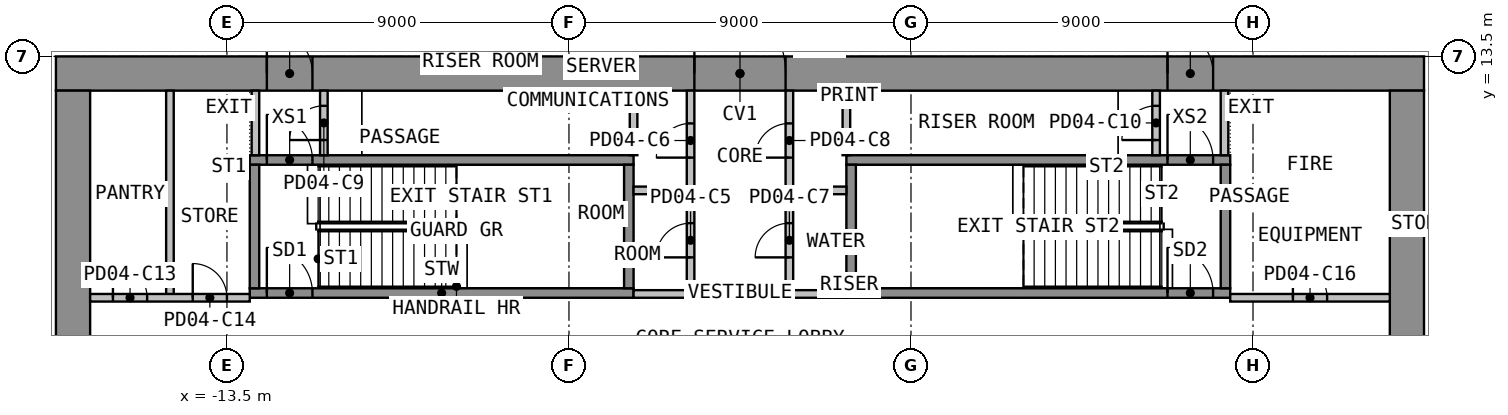
"""IFC4 building model, lengths in metres.
Left out: names, types, materials, properties, quantities, classifications, styles, units other than length and angle.
Written with IfcOpenShell. Run it as: python <this file> out.ifc"""

import sys

from ifc_helpers import new_model, si_unit, direction, frame, frame_2d, origin, place, context, subcontext, project, spatial, rectangle, extrude, element, fill, save


model = new_model("IFC4")
c1 = context("Model", 3, precision=1e-05, world=origin(), true_north=direction((0.0, 1.0)))
c2 = subcontext(c1, "Body", "Model", "MODEL_VIEW")
j1 = project(units=[si_unit("LENGTHUNIT", "METRE"), si_unit("PLANEANGLEUNIT", "RADIAN")], contexts=[c1])
p1 = place(None, origin())
s1 = spatial("IfcSite", under=j1, at=p1, CompositionType="ELEMENT")
p2 = place(p1, origin())
s2 = spatial("IfcBuilding", under=s1, at=p2, CompositionType="ELEMENT")
p3 = place(p2, frame((0.0, 0.0, 20.4)))
s3 = spatial("IfcBuildingStorey", under=s2, at=p3, CompositionType="ELEMENT", Elevation=20.4)
p4 = place(p3, frame((-18.0, 13.05, 0.0), z_axis=(0.0, 0.0, 1.0), x_axis=(1.0, 0.0, 0.0)))
e1 = element("IfcWall", 1, at=p4, inside=s3, PredefinedType="SHEAR", context=c2, shape_type="SweptSolid", body=[
    extrude(rectangle(XDim=36.0, YDim=0.9, at=frame_2d((18.0, 0.0))), origin(), (0.0, 0.0, 1.0), 4.4),
])
p5 = place(p4, frame((16.8, 0.0, 0.0)))
e2 = element("IfcOpeningElement", 2, at=p5, cuts=e1, PredefinedType="OPENING", context=c2, shape_type="SweptSolid", body=[
    extrude(rectangle(XDim=2.4, YDim=2.1, at=frame_2d((1.2, 1.05))), frame((0.0, 0.46, 0.0), z_axis=(0.0, -1.0, 0.0), x_axis=(1.0, 0.0, 0.0)), (0.0, 0.0, 1.0), 0.92),
])
p6 = place(p4, frame((5.55, 0.0, 0.0)))
e3 = element("IfcOpeningElement", 3, at=p6, cuts=e1, PredefinedType="OPENING", context=c2, shape_type="SweptSolid", body=[
    extrude(rectangle(XDim=1.2, YDim=2.1, at=frame_2d((0.6, 1.05))), frame((0.0, 0.46, 0.0), z_axis=(0.0, -1.0, 0.0), x_axis=(1.0, 0.0, 0.0)), (0.0, 0.0, 1.0), 0.92),
])
p7 = place(p4, frame((29.25, 0.0, 0.0)))
e4 = element("IfcOpeningElement", 4, at=p7, cuts=e1, PredefinedType="OPENING", context=c2, shape_type="SweptSolid", body=[
    extrude(rectangle(XDim=1.2, YDim=2.1, at=frame_2d((0.6, 1.05))), frame((0.0, 0.46, 0.0), z_axis=(0.0, -1.0, 0.0), x_axis=(1.0, 0.0, 0.0)), (0.0, 0.0, 1.0), 0.92),
])
p8 = place(p3, frame((-17.55, -12.6, 0.0), z_axis=(0.0, 0.0, 1.0), x_axis=(0.0, 1.0, 0.0)))
e5 = element("IfcWall", 5, at=p8, inside=s3, PredefinedType="SHEAR", context=c2, shape_type="SweptSolid", body=[
    extrude(rectangle(XDim=25.2, YDim=0.9, at=frame_2d((12.6, 0.0))), origin(), (0.0, 0.0, 1.0), 4.4),
])
p9 = place(p8, frame((11.4, 0.0, 0.0)))
e6 = element("IfcOpeningElement", 6, at=p9, cuts=e5, PredefinedType="OPENING", context=c2, shape_type="SweptSolid", body=[
    extrude(rectangle(XDim=2.4, YDim=2.1, at=frame_2d((1.2, 1.05))), frame((0.0, 0.46, 0.0), z_axis=(0.0, -1.0, 0.0), x_axis=(1.0, 0.0, 0.0)), (0.0, 0.0, 1.0), 0.92),
])
p10 = place(p3, frame((17.55, -12.6, 0.0), z_axis=(0.0, 0.0, 1.0), x_axis=(0.0, 1.0, 0.0)))
e7 = element("IfcWall", 7, at=p10, inside=s3, PredefinedType="SHEAR", context=c2, shape_type="SweptSolid", body=[
    extrude(rectangle(XDim=25.2, YDim=0.9, at=frame_2d((12.6, 0.0))), origin(), (0.0, 0.0, 1.0), 4.4),
])
p11 = place(p10, frame((11.4, 0.0, 0.0)))
e8 = element("IfcOpeningElement", 8, at=p11, cuts=e7, PredefinedType="OPENING", context=c2, shape_type="SweptSolid", body=[
    extrude(rectangle(XDim=2.4, YDim=2.1, at=frame_2d((1.2, 1.05))), frame((0.0, 0.46, 0.0), z_axis=(0.0, -1.0, 0.0), x_axis=(1.0, 0.0, 0.0)), (0.0, 0.0, 1.0), 0.92),
])
p12 = place(p3, frame((-12.9, 7.275, 0.0), z_axis=(0.0, 0.0, 1.0), x_axis=(1.0, 0.0, 0.0)))
e9 = element("IfcWall", 9, at=p12, inside=s3, PredefinedType="SHEAR", context=c2, shape_type="SweptSolid", body=[
    extrude(rectangle(XDim=10.1, YDim=0.25, at=frame_2d((5.05, 0.0))), origin(), (0.0, 0.0, 1.0), 4.4),
])
p13 = place(p12, frame((0.45, 0.0, 0.0)))
e10 = element("IfcOpeningElement", 10, at=p13, cuts=e9, PredefinedType="OPENING", context=c2, shape_type="SweptSolid", body=[
    extrude(rectangle(XDim=1.2, YDim=2.1, at=frame_2d((0.6, 1.05))), frame((0.0, 0.135, 0.0), z_axis=(0.0, -1.0, 0.0), x_axis=(1.0, 0.0, 0.0)), (0.0, 0.0, 1.0), 0.27),
])
p14 = place(p3, frame((-12.9, 10.775, 0.0), z_axis=(0.0, 0.0, 1.0), x_axis=(1.0, 0.0, 0.0)))
e11 = element("IfcWall", 11, at=p14, inside=s3, PredefinedType="SHEAR", context=c2, shape_type="SweptSolid", body=[
    extrude(rectangle(XDim=10.1, YDim=0.25, at=frame_2d((5.05, 0.0))), origin(), (0.0, 0.0, 1.0), 4.4),
])
p15 = place(p14, frame((0.45, 0.0, 0.0)))
e12 = element("IfcOpeningElement", 12, at=p15, cuts=e11, PredefinedType="OPENING", context=c2, shape_type="SweptSolid", body=[
    extrude(rectangle(XDim=1.2, YDim=2.1, at=frame_2d((0.6, 1.05))), frame((0.0, 0.135, 0.0), z_axis=(0.0, -1.0, 0.0), x_axis=(1.0, 0.0, 0.0)), (0.0, 0.0, 1.0), 0.27),
])
for number, where, z_axis, x_axis in (
    (13, (-12.775, 7.4, 0.0), (0.0, 0.0, 1.0), (0.0, 1.0, 0.0)),
    (14, (-2.925, 7.4, 0.0), (0.0, 0.0, 1.0), (0.0, 1.0, 0.0)),
):
    element("IfcWall", number, at=place(p3, frame(where, z_axis=z_axis, x_axis=x_axis)), inside=s3, PredefinedType="SHEAR", context=c2, shape_type="SweptSolid", body=[
        extrude(rectangle(XDim=3.25, YDim=0.25, at=frame_2d((1.625, 0.0))), origin(), (0.0, 0.0, 1.0), 4.4),
    ])
p16 = place(p3, frame((2.8, 7.275, 0.0), z_axis=(0.0, 0.0, 1.0), x_axis=(1.0, 0.0, 0.0)))
e15 = element("IfcWall", 15, at=p16, inside=s3, PredefinedType="SHEAR", context=c2, shape_type="SweptSolid", body=[
    extrude(rectangle(XDim=10.1, YDim=0.25, at=frame_2d((5.05, 0.0))), origin(), (0.0, 0.0, 1.0), 4.4),
])
p17 = place(p16, frame((8.45, 0.0, 0.0)))
e16 = element("IfcOpeningElement", 16, at=p17, cuts=e15, PredefinedType="OPENING", context=c2, shape_type="SweptSolid", body=[
    extrude(rectangle(XDim=1.2, YDim=2.1, at=frame_2d((0.6, 1.05))), frame((0.0, 0.135, 0.0), z_axis=(0.0, -1.0, 0.0), x_axis=(1.0, 0.0, 0.0)), (0.0, 0.0, 1.0), 0.27),
])
p18 = place(p3, frame((2.8, 10.775, 0.0), z_axis=(0.0, 0.0, 1.0), x_axis=(1.0, 0.0, 0.0)))
e17 = element("IfcWall", 17, at=p18, inside=s3, PredefinedType="SHEAR", context=c2, shape_type="SweptSolid", body=[
    extrude(rectangle(XDim=10.1, YDim=0.25, at=frame_2d((5.05, 0.0))), origin(), (0.0, 0.0, 1.0), 4.4),
])
p19 = place(p18, frame((8.45, 0.0, 0.0)))
e18 = element("IfcOpeningElement", 18, at=p19, cuts=e17, PredefinedType="OPENING", context=c2, shape_type="SweptSolid", body=[
    extrude(rectangle(XDim=1.2, YDim=2.1, at=frame_2d((0.6, 1.05))), frame((0.0, 0.135, 0.0), z_axis=(0.0, -1.0, 0.0), x_axis=(1.0, 0.0, 0.0)), (0.0, 0.0, 1.0), 0.27),
])
for number, where, z_axis, x_axis in (
    (19, (2.925, 7.4, 0.0), (0.0, 0.0, 1.0), (0.0, 1.0, 0.0)),
    (20, (12.775, 7.4, 0.0), (0.0, 0.0, 1.0), (0.0, 1.0, 0.0)),
):
    element("IfcWall", number, at=place(p3, frame(where, z_axis=z_axis, x_axis=x_axis)), inside=s3, PredefinedType="SHEAR", context=c2, shape_type="SweptSolid", body=[
        extrude(rectangle(XDim=3.25, YDim=0.25, at=frame_2d((1.625, 0.0))), origin(), (0.0, 0.0, 1.0), 4.4),
    ])
for number, where, z_axis, x_axis in (
    (21, (-2.8, 7.25, 0.0), (0.0, 0.0, 1.0), (1.0, 0.0, 0.0)),
    (22, (-2.8, 9.975, 0.0), (0.0, 0.0, 1.0), (1.0, 0.0, 0.0)),
    (23, (1.4, 7.25, 0.0), (0.0, 0.0, 1.0), (1.0, 0.0, 0.0)),
    (24, (1.4, 9.975, 0.0), (0.0, 0.0, 1.0), (1.0, 0.0, 0.0)),
):
    element("IfcWall", number, at=place(p3, frame(where, z_axis=z_axis, x_axis=x_axis)), inside=s3, PredefinedType="PARTITIONING", context=c2, shape_type="SweptSolid", body=[
        extrude(rectangle(XDim=1.4, YDim=0.2, at=frame_2d((0.7, 0.0))), origin(), (0.0, 0.0, 1.0), 4.4),
    ])
p20 = place(p3, frame((-1.3, 7.15, 0.0), z_axis=(0.0, 0.0, 1.0), x_axis=(0.0, 1.0, 0.0)))
e25 = element("IfcWall", 25, at=p20, inside=s3, PredefinedType="PARTITIONING", context=c2, shape_type="SweptSolid", body=[
    extrude(rectangle(XDim=5.45, YDim=0.2, at=frame_2d((2.725, 0.0))), origin(), (0.0, 0.0, 1.0), 4.4),
])
p21 = place(p20, frame((1.062, 0.0, 0.0)))
e26 = element("IfcOpeningElement", 26, at=p21, cuts=e25, PredefinedType="OPENING", context=c2, shape_type="SweptSolid", body=[
    extrude(rectangle(XDim=0.9, YDim=2.1, at=frame_2d((0.45, 1.05))), frame((0.0, 0.11, 0.0), z_axis=(0.0, -1.0, 0.0), x_axis=(1.0, 0.0, 0.0)), (0.0, 0.0, 1.0), 0.22),
])
p22 = place(p20, frame((3.688, 0.0, 0.0)))
e27 = element("IfcOpeningElement", 27, at=p22, cuts=e25, PredefinedType="OPENING", context=c2, shape_type="SweptSolid", body=[
    extrude(rectangle(XDim=0.9, YDim=2.1, at=frame_2d((0.45, 1.05))), frame((0.0, 0.11, 0.0), z_axis=(0.0, -1.0, 0.0), x_axis=(1.0, 0.0, 0.0)), (0.0, 0.0, 1.0), 0.22),
])
p23 = place(p3, frame((1.3, 7.15, 0.0), z_axis=(0.0, 0.0, 1.0), x_axis=(0.0, 1.0, 0.0)))
e28 = element("IfcWall", 28, at=p23, inside=s3, PredefinedType="PARTITIONING", context=c2, shape_type="SweptSolid", body=[
    extrude(rectangle(XDim=5.45, YDim=0.2, at=frame_2d((2.725, 0.0))), origin(), (0.0, 0.0, 1.0), 4.4),
])
p24 = place(p23, frame((1.062, 0.0, 0.0)))
e29 = element("IfcOpeningElement", 29, at=p24, cuts=e28, PredefinedType="OPENING", context=c2, shape_type="SweptSolid", body=[
    extrude(rectangle(XDim=0.9, YDim=2.1, at=frame_2d((0.45, 1.05))), frame((0.0, 0.11, 0.0), z_axis=(0.0, -1.0, 0.0), x_axis=(1.0, 0.0, 0.0)), (0.0, 0.0, 1.0), 0.22),
])
p25 = place(p23, frame((3.688, 0.0, 0.0)))
e30 = element("IfcOpeningElement", 30, at=p25, cuts=e28, PredefinedType="OPENING", context=c2, shape_type="SweptSolid", body=[
    extrude(rectangle(XDim=0.9, YDim=2.1, at=frame_2d((0.45, 1.05))), frame((0.0, 0.11, 0.0), z_axis=(0.0, -1.0, 0.0), x_axis=(1.0, 0.0, 0.0)), (0.0, 0.0, 1.0), 0.22),
])
p26 = place(p3, frame((-12.75, 10.9, 0.0), z_axis=(0.0, 0.0, 1.0), x_axis=(0.0, 1.0, 0.0)))
e31 = element("IfcWall", 31, at=p26, inside=s3, PredefinedType="PARTITIONING", context=c2, shape_type="SweptSolid", body=[
    extrude(rectangle(XDim=1.7, YDim=0.2, at=frame_2d((0.85, 0.0))), origin(), (0.0, 0.0, 1.0), 4.4),
])
p27 = place(p3, frame((-10.95, 10.9, 0.0), z_axis=(0.0, 0.0, 1.0), x_axis=(0.0, 1.0, 0.0)))
e32 = element("IfcWall", 32, at=p27, inside=s3, PredefinedType="PARTITIONING", context=c2, shape_type="SweptSolid", body=[
    extrude(rectangle(XDim=1.7, YDim=0.2, at=frame_2d((0.85, 0.0))), origin(), (0.0, 0.0, 1.0), 4.4),
])
p28 = place(p27, frame((0.4, 0.0, 0.0)))
e33 = element("IfcOpeningElement", 33, at=p28, cuts=e32, PredefinedType="OPENING", context=c2, shape_type="SweptSolid", body=[
    extrude(rectangle(XDim=0.9, YDim=2.1, at=frame_2d((0.45, 1.05))), frame((0.0, 0.11, 0.0), z_axis=(0.0, -1.0, 0.0), x_axis=(1.0, 0.0, 0.0)), (0.0, 0.0, 1.0), 0.22),
])
p29 = place(p3, frame((12.75, 10.9, 0.0), z_axis=(0.0, 0.0, 1.0), x_axis=(0.0, 1.0, 0.0)))
e34 = element("IfcWall", 34, at=p29, inside=s3, PredefinedType="PARTITIONING", context=c2, shape_type="SweptSolid", body=[
    extrude(rectangle(XDim=1.7, YDim=0.2, at=frame_2d((0.85, 0.0))), origin(), (0.0, 0.0, 1.0), 4.4),
])
p30 = place(p3, frame((10.95, 10.9, 0.0), z_axis=(0.0, 0.0, 1.0), x_axis=(0.0, 1.0, 0.0)))
e35 = element("IfcWall", 35, at=p30, inside=s3, PredefinedType="PARTITIONING", context=c2, shape_type="SweptSolid", body=[
    extrude(rectangle(XDim=1.7, YDim=0.2, at=frame_2d((0.85, 0.0))), origin(), (0.0, 0.0, 1.0), 4.4),
])
p31 = place(p30, frame((0.4, 0.0, 0.0)))
e36 = element("IfcOpeningElement", 36, at=p31, cuts=e35, PredefinedType="OPENING", context=c2, shape_type="SweptSolid", body=[
    extrude(rectangle(XDim=0.9, YDim=2.1, at=frame_2d((0.45, 1.05))), frame((0.0, 0.11, 0.0), z_axis=(0.0, -1.0, 0.0), x_axis=(1.0, 0.0, 0.0)), (0.0, 0.0, 1.0), 0.22),
])
p32 = place(p3, frame((-15.0, 7.15, 0.0), z_axis=(0.0, 0.0, 1.0), x_axis=(0.0, 1.0, 0.0)))
e37 = element("IfcWall", 37, at=p32, inside=s3, PredefinedType="PARTITIONING", context=c2, shape_type="SweptSolid", body=[
    extrude(rectangle(XDim=5.45, YDim=0.2, at=frame_2d((2.725, 0.0))), origin(), (0.0, 0.0, 1.0), 4.4),
])
p33 = place(p3, frame((-17.1, 7.15, 0.0), z_axis=(0.0, 0.0, 1.0), x_axis=(1.0, 0.0, 0.0)))
e38 = element("IfcWall", 38, at=p33, inside=s3, PredefinedType="PARTITIONING", context=c2, shape_type="SweptSolid", body=[
    extrude(rectangle(XDim=4.2, YDim=0.2, at=frame_2d((2.1, 0.0))), origin(), (0.0, 0.0, 1.0), 4.4),
])
p34 = place(p33, frame((0.6, 0.0, 0.0)))
e39 = element("IfcOpeningElement", 39, at=p34, cuts=e38, PredefinedType="OPENING", context=c2, shape_type="SweptSolid", body=[
    extrude(rectangle(XDim=0.9, YDim=2.1, at=frame_2d((0.45, 1.05))), frame((0.0, 0.11, 0.0), z_axis=(0.0, -1.0, 0.0), x_axis=(1.0, 0.0, 0.0)), (0.0, 0.0, 1.0), 0.22),
])
p35 = place(p33, frame((2.7, 0.0, 0.0)))
e40 = element("IfcOpeningElement", 40, at=p35, cuts=e38, PredefinedType="OPENING", context=c2, shape_type="SweptSolid", body=[
    extrude(rectangle(XDim=0.9, YDim=2.1, at=frame_2d((0.45, 1.05))), frame((0.0, 0.11, 0.0), z_axis=(0.0, -1.0, 0.0), x_axis=(1.0, 0.0, 0.0)), (0.0, 0.0, 1.0), 0.22),
])
p36 = place(p3, frame((12.9, 7.15, 0.0), z_axis=(0.0, 0.0, 1.0), x_axis=(1.0, 0.0, 0.0)))
e41 = element("IfcWall", 41, at=p36, inside=s3, PredefinedType="PARTITIONING", context=c2, shape_type="SweptSolid", body=[
    extrude(rectangle(XDim=4.2, YDim=0.2, at=frame_2d((2.1, 0.0))), origin(), (0.0, 0.0, 1.0), 4.4),
])
p37 = place(p36, frame((1.65, 0.0, 0.0)))
e42 = element("IfcOpeningElement", 42, at=p37, cuts=e41, PredefinedType="OPENING", context=c2, shape_type="SweptSolid", body=[
    extrude(rectangle(XDim=0.9, YDim=2.1, at=frame_2d((0.45, 1.05))), frame((0.0, 0.11, 0.0), z_axis=(0.0, -1.0, 0.0), x_axis=(1.0, 0.0, 0.0)), (0.0, 0.0, 1.0), 0.22),
])
for number, where, z_axis, x_axis in (
    (43, (-2.8, 10.901, 0.0), (0.0, 0.0, 1.0), (0.0, 1.0, 0.0)),
    (44, (2.8, 12.599, 0.0), (0.0, 0.0, 1.0), (0.0, -1.0, 0.0)),
):
    element("IfcWall", number, at=place(p3, frame(where, z_axis=z_axis, x_axis=x_axis)), inside=s3, PredefinedType="PARTITIONING", context=c2, shape_type="SweptSolid", body=[
        extrude(rectangle(XDim=1.698, YDim=0.2, at=frame_2d((0.849, 0.0))), origin(), (0.0, 0.0, 1.0), 4.4),
    ])
p38 = place(p5, origin())
e45 = element("IfcDoor", 45, at=p38, inside=s3, OperationType="DOUBLE_DOOR_DOUBLE_SWING", PredefinedType="DOOR", context=c2, shape_type="SweptSolid", body=[
    extrude(rectangle(XDim=2.4, YDim=2.1, at=frame_2d((1.2, 1.05))), frame((0.0, 0.025, 0.0), z_axis=(0.0, -1.0, 0.0), x_axis=(1.0, 0.0, 0.0)), (0.0, 0.0, 1.0), 0.05),
])
fill(e2, e45)
p39 = place(p6, origin())
e46 = element("IfcDoor", 46, at=p39, inside=s3, OperationType="SINGLE_SWING_RIGHT", PredefinedType="DOOR", context=c2, shape_type="SweptSolid", body=[
    extrude(rectangle(XDim=1.2, YDim=2.1, at=frame_2d((0.6, 1.05))), frame((0.0, 0.025, 0.0), z_axis=(0.0, -1.0, 0.0), x_axis=(1.0, 0.0, 0.0)), (0.0, 0.0, 1.0), 0.05),
])
fill(e3, e46)
p40 = place(p7, origin())
e47 = element("IfcDoor", 47, at=p40, inside=s3, OperationType="SINGLE_SWING_RIGHT", PredefinedType="DOOR", context=c2, shape_type="SweptSolid", body=[
    extrude(rectangle(XDim=1.2, YDim=2.1, at=frame_2d((0.6, 1.05))), frame((0.0, 0.025, 0.0), z_axis=(0.0, -1.0, 0.0), x_axis=(1.0, 0.0, 0.0)), (0.0, 0.0, 1.0), 0.05),
])
fill(e4, e47)
p41 = place(p13, origin())
e48 = element("IfcDoor", 48, at=p41, inside=s3, OperationType="SINGLE_SWING_LEFT", PredefinedType="DOOR", context=c2, shape_type="SweptSolid", body=[
    extrude(rectangle(XDim=1.2, YDim=2.1, at=frame_2d((0.6, 1.05))), frame((0.0, 0.025, 0.0), z_axis=(0.0, -1.0, 0.0), x_axis=(1.0, 0.0, 0.0)), (0.0, 0.0, 1.0), 0.05),
])
fill(e10, e48)
p42 = place(p17, origin())
e49 = element("IfcDoor", 49, at=p42, inside=s3, OperationType="SINGLE_SWING_LEFT", PredefinedType="DOOR", context=c2, shape_type="SweptSolid", body=[
    extrude(rectangle(XDim=1.2, YDim=2.1, at=frame_2d((0.6, 1.05))), frame((0.0, 0.025, 0.0), z_axis=(0.0, -1.0, 0.0), x_axis=(1.0, 0.0, 0.0)), (0.0, 0.0, 1.0), 0.05),
])
fill(e16, e49)
p43 = place(p21, origin())
e50 = element("IfcDoor", 50, at=p43, inside=s3, OperationType="SINGLE_SWING_LEFT", PredefinedType="DOOR", context=c2, shape_type="SweptSolid", body=[
    extrude(rectangle(XDim=0.9, YDim=2.1, at=frame_2d((0.45, 1.05))), frame((0.0, 0.025, 0.0), z_axis=(0.0, -1.0, 0.0), x_axis=(1.0, 0.0, 0.0)), (0.0, 0.0, 1.0), 0.05),
])
fill(e26, e50)
p44 = place(p22, origin())
e51 = element("IfcDoor", 51, at=p44, inside=s3, OperationType="SINGLE_SWING_LEFT", PredefinedType="DOOR", context=c2, shape_type="SweptSolid", body=[
    extrude(rectangle(XDim=0.9, YDim=2.1, at=frame_2d((0.45, 1.05))), frame((0.0, 0.025, 0.0), z_axis=(0.0, -1.0, 0.0), x_axis=(1.0, 0.0, 0.0)), (0.0, 0.0, 1.0), 0.05),
])
fill(e27, e51)
p45 = place(p24, origin())
e52 = element("IfcDoor", 52, at=p45, inside=s3, OperationType="SINGLE_SWING_LEFT", PredefinedType="DOOR", context=c2, shape_type="SweptSolid", body=[
    extrude(rectangle(XDim=0.9, YDim=2.1, at=frame_2d((0.45, 1.05))), frame((0.0, 0.025, 0.0), z_axis=(0.0, -1.0, 0.0), x_axis=(1.0, 0.0, 0.0)), (0.0, 0.0, 1.0), 0.05),
])
fill(e29, e52)
p46 = place(p25, origin())
e53 = element("IfcDoor", 53, at=p46, inside=s3, OperationType="SINGLE_SWING_LEFT", PredefinedType="DOOR", context=c2, shape_type="SweptSolid", body=[
    extrude(rectangle(XDim=0.9, YDim=2.1, at=frame_2d((0.45, 1.05))), frame((0.0, 0.025, 0.0), z_axis=(0.0, -1.0, 0.0), x_axis=(1.0, 0.0, 0.0)), (0.0, 0.0, 1.0), 0.05),
])
fill(e30, e53)
p47 = place(p15, origin())
e54 = element("IfcDoor", 54, at=p47, inside=s3, OperationType="SINGLE_SWING_RIGHT", PredefinedType="DOOR", context=c2, shape_type="SweptSolid", body=[
    extrude(rectangle(XDim=1.2, YDim=2.1, at=frame_2d((0.6, 1.05))), frame((0.0, 0.025, 0.0), z_axis=(0.0, -1.0, 0.0), x_axis=(1.0, 0.0, 0.0)), (0.0, 0.0, 1.0), 0.05),
])
fill(e12, e54)
p48 = place(p28, origin())
e55 = element("IfcDoor", 55, at=p48, inside=s3, OperationType="SINGLE_SWING_LEFT", PredefinedType="DOOR", context=c2, shape_type="SweptSolid", body=[
    extrude(rectangle(XDim=0.9, YDim=2.1, at=frame_2d((0.45, 1.05))), frame((0.0, 0.025, 0.0), z_axis=(0.0, -1.0, 0.0), x_axis=(1.0, 0.0, 0.0)), (0.0, 0.0, 1.0), 0.05),
])
fill(e33, e55)
p49 = place(p19, origin())
e56 = element("IfcDoor", 56, at=p49, inside=s3, OperationType="SINGLE_SWING_RIGHT", PredefinedType="DOOR", context=c2, shape_type="SweptSolid", body=[
    extrude(rectangle(XDim=1.2, YDim=2.1, at=frame_2d((0.6, 1.05))), frame((0.0, 0.025, 0.0), z_axis=(0.0, -1.0, 0.0), x_axis=(1.0, 0.0, 0.0)), (0.0, 0.0, 1.0), 0.05),
])
fill(e18, e56)
p50 = place(p31, origin())
e57 = element("IfcDoor", 57, at=p50, inside=s3, OperationType="SINGLE_SWING_LEFT", PredefinedType="DOOR", context=c2, shape_type="SweptSolid", body=[
    extrude(rectangle(XDim=0.9, YDim=2.1, at=frame_2d((0.45, 1.05))), frame((0.0, 0.025, 0.0), z_axis=(0.0, -1.0, 0.0), x_axis=(1.0, 0.0, 0.0)), (0.0, 0.0, 1.0), 0.05),
])
fill(e36, e57)
p51 = place(p34, origin())
e58 = element("IfcDoor", 58, at=p51, inside=s3, OperationType="SINGLE_SWING_LEFT", PredefinedType="DOOR", context=c2, shape_type="SweptSolid", body=[
    extrude(rectangle(XDim=0.9, YDim=2.1, at=frame_2d((0.45, 1.05))), frame((0.0, 0.025, 0.0), z_axis=(0.0, -1.0, 0.0), x_axis=(1.0, 0.0, 0.0)), (0.0, 0.0, 1.0), 0.05),
])
fill(e39, e58)
p52 = place(p35, origin())
e59 = element("IfcDoor", 59, at=p52, inside=s3, OperationType="SINGLE_SWING_LEFT", PredefinedType="DOOR", context=c2, shape_type="SweptSolid", body=[
    extrude(rectangle(XDim=0.9, YDim=2.1, at=frame_2d((0.45, 1.05))), frame((0.0, 0.025, 0.0), z_axis=(0.0, -1.0, 0.0), x_axis=(1.0, 0.0, 0.0)), (0.0, 0.0, 1.0), 0.05),
])
fill(e40, e59)
p53 = place(p37, origin())
e60 = element("IfcDoor", 60, at=p53, inside=s3, OperationType="SINGLE_SWING_LEFT", PredefinedType="DOOR", context=c2, shape_type="SweptSolid", body=[
    extrude(rectangle(XDim=0.9, YDim=2.1, at=frame_2d((0.45, 1.05))), frame((0.0, 0.025, 0.0), z_axis=(0.0, -1.0, 0.0), x_axis=(1.0, 0.0, 0.0)), (0.0, 0.0, 1.0), 0.05),
])
fill(e42, e60)
save(model, sys.argv[1])
